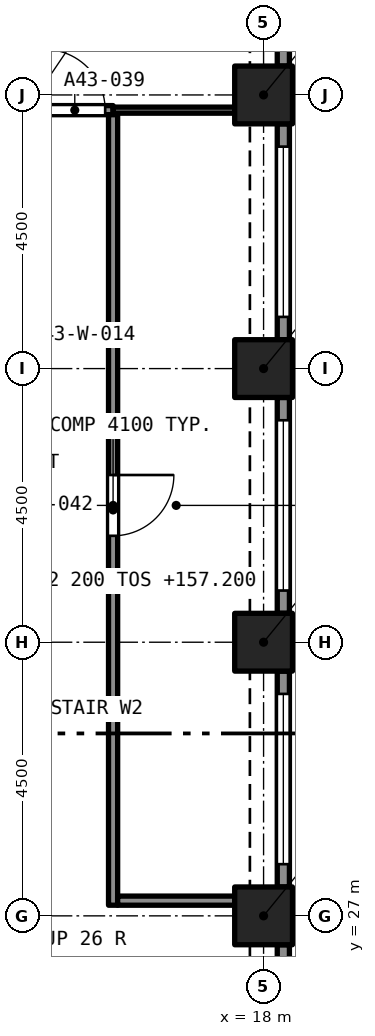
"""IFC4 building model, lengths in metres.
Left out: names, types, materials, properties, quantities, classifications, styles, units other than length and angle.
Written with IfcOpenShell. Run it as: python <this file> out.ifc"""

import sys

from ifc_helpers import new_model, si_unit, direction, frame, frame_2d, origin, origin_2d, place, context, subcontext, project, spatial, rectangle, extrude, element, fill, save


model = new_model("IFC4")
c1 = context("Model", 3, precision=1e-05, world=origin(), true_north=direction((0.0, 1.0)))
c2 = subcontext(c1, "Body", "Model", "MODEL_VIEW")
j1 = project(units=[si_unit("LENGTHUNIT", "METRE"), si_unit("PLANEANGLEUNIT", "RADIAN")], contexts=[c1])
p1 = place(None, origin())
s1 = spatial("IfcSite", under=j1, at=p1, CompositionType="ELEMENT")
p2 = place(p1, origin())
s2 = spatial("IfcBuilding", under=s1, at=p2, CompositionType="ELEMENT")
p3 = place(p2, frame((0.0, 0.0, 155.0)))
s3 = spatial("IfcBuildingStorey", under=s2, at=p3, CompositionType="ELEMENT", Elevation=155.0)
for number, where, z_axis, x_axis in (
    (1, (18.0, 27.0, 0.0), (0.0, 0.0, 1.0), (1.0, 0.0, 0.0)),
    (2, (18.0, 31.5, 0.0), (0.0, 0.0, 1.0), (1.0, 0.0, 0.0)),
    (3, (18.0, 36.0, 0.0), (0.0, 0.0, 1.0), (1.0, 0.0, 0.0)),
    (4, (18.0, 40.5, 0.0), (0.0, 0.0, 1.0), (1.0, 0.0, 0.0)),
):
    element("IfcColumn", number, at=place(p3, frame(where, z_axis=z_axis, x_axis=x_axis)), inside=s3, PredefinedType="COLUMN", context=c2, shape_type="SweptSolid", body=[
        extrude(rectangle(XDim=0.95, YDim=0.95, at=origin_2d()), origin(), (0.0, 0.0, 1.0), 4.4),
    ])
p4 = place(p3, frame((18.325, 26.525, 0.0), z_axis=(0.0, 0.0, 1.0), x_axis=(0.0, -1.0, 0.0)))
e5 = element("IfcWall", 5, at=p4, inside=s3, PredefinedType="SOLIDWALL", context=c2, shape_type="SweptSolid", body=[
    extrude(rectangle(XDim=3.55, YDim=0.2, at=frame_2d((1.775, 0.0))), origin(), (0.0, 0.0, 1.0), 4.4),
])
p5 = place(p4, frame((0.375, 0.0, 0.45)))
e6 = element("IfcOpeningElement", 6, at=p5, cuts=e5, PredefinedType="OPENING", context=c2, shape_type="SweptSolid", body=[
    extrude(rectangle(XDim=2.8, YDim=2.55, at=frame_2d((1.4, 1.275))), frame((0.0, 0.11, 0.0), z_axis=(0.0, -1.0, 0.0), x_axis=(1.0, 0.0, 0.0)), (0.0, 0.0, 1.0), 0.22),
])
p6 = place(p3, frame((18.325, 31.025, 0.0), z_axis=(0.0, 0.0, 1.0), x_axis=(0.0, -1.0, 0.0)))
e7 = element("IfcWall", 7, at=p6, inside=s3, PredefinedType="SOLIDWALL", context=c2, shape_type="SweptSolid", body=[
    extrude(rectangle(XDim=3.55, YDim=0.2, at=frame_2d((1.775, 0.0))), origin(), (0.0, 0.0, 1.0), 4.4),
])
p7 = place(p6, frame((0.375, 0.0, 0.45)))
e8 = element("IfcOpeningElement", 8, at=p7, cuts=e7, PredefinedType="OPENING", context=c2, shape_type="SweptSolid", body=[
    extrude(rectangle(XDim=2.8, YDim=2.55, at=frame_2d((1.4, 1.275))), frame((0.0, 0.11, 0.0), z_axis=(0.0, -1.0, 0.0), x_axis=(1.0, 0.0, 0.0)), (0.0, 0.0, 1.0), 0.22),
])
p8 = place(p3, frame((18.325, 35.525, 0.0), z_axis=(0.0, 0.0, 1.0), x_axis=(0.0, -1.0, 0.0)))
e9 = element("IfcWall", 9, at=p8, inside=s3, PredefinedType="SOLIDWALL", context=c2, shape_type="SweptSolid", body=[
    extrude(rectangle(XDim=3.55, YDim=0.2, at=frame_2d((1.775, 0.0))), origin(), (0.0, 0.0, 1.0), 4.4),
])
p9 = place(p8, frame((0.375, 0.0, 0.45)))
e10 = element("IfcOpeningElement", 10, at=p9, cuts=e9, PredefinedType="OPENING", context=c2, shape_type="SweptSolid", body=[
    extrude(rectangle(XDim=2.8, YDim=2.55, at=frame_2d((1.4, 1.275))), frame((0.0, 0.11, 0.0), z_axis=(0.0, -1.0, 0.0), x_axis=(1.0, 0.0, 0.0)), (0.0, 0.0, 1.0), 0.22),
])
p10 = place(p3, frame((18.325, 40.025, 0.0), z_axis=(0.0, 0.0, 1.0), x_axis=(0.0, -1.0, 0.0)))
e11 = element("IfcWall", 11, at=p10, inside=s3, PredefinedType="SOLIDWALL", context=c2, shape_type="SweptSolid", body=[
    extrude(rectangle(XDim=3.55, YDim=0.2, at=frame_2d((1.775, 0.0))), origin(), (0.0, 0.0, 1.0), 4.4),
])
p11 = place(p10, frame((0.375, 0.0, 0.45)))
e12 = element("IfcOpeningElement", 12, at=p11, cuts=e11, PredefinedType="OPENING", context=c2, shape_type="SweptSolid", body=[
    extrude(rectangle(XDim=2.8, YDim=2.55, at=frame_2d((1.4, 1.275))), frame((0.0, 0.11, 0.0), z_axis=(0.0, -1.0, 0.0), x_axis=(1.0, 0.0, 0.0)), (0.0, 0.0, 1.0), 0.22),
])
p12 = place(p3, frame((18.325, 44.525, 0.0), z_axis=(0.0, 0.0, 1.0), x_axis=(0.0, -1.0, 0.0)))
e13 = element("IfcWall", 13, at=p12, inside=s3, PredefinedType="SOLIDWALL", context=c2, shape_type="SweptSolid", body=[
    extrude(rectangle(XDim=3.55, YDim=0.2, at=frame_2d((1.775, 0.0))), origin(), (0.0, 0.0, 1.0), 4.4),
])
p13 = place(p12, frame((0.375, 0.0, 0.45)))
e14 = element("IfcOpeningElement", 14, at=p13, cuts=e13, PredefinedType="OPENING", context=c2, shape_type="SweptSolid", body=[
    extrude(rectangle(XDim=2.8, YDim=2.55, at=frame_2d((1.4, 1.275))), frame((0.0, 0.11, 0.0), z_axis=(0.0, -1.0, 0.0), x_axis=(1.0, 0.0, 0.0)), (0.0, 0.0, 1.0), 0.22),
])
p14 = place(p3, frame((13.25, 40.25, 0.0), z_axis=(0.0, 0.0, 1.0), x_axis=(1.0, 0.0, 0.0)))
e15 = element("IfcWall", 15, at=p14, inside=s3, PredefinedType="PARTITIONING", context=c2, shape_type="SweptSolid", body=[
    extrude(rectangle(XDim=2.275, YDim=0.15, at=frame_2d((1.137, 0.0))), origin(), (0.0, 0.0, 1.0), 4.1),
])
p15 = place(p14, frame((1.145, 0.0, 0.0)))
e16 = element("IfcOpeningElement", 16, at=p15, cuts=e15, PredefinedType="OPENING", context=c2, shape_type="SweptSolid", body=[
    extrude(rectangle(XDim=1.0, YDim=2.1, at=frame_2d((0.5, 1.05))), frame((0.0, 0.085, 0.0), z_axis=(0.0, -1.0, 0.0), x_axis=(1.0, 0.0, 0.0)), (0.0, 0.0, 1.0), 0.17),
])
p16 = place(p3, frame((15.525, 40.25, 0.0), z_axis=(0.0, 0.0, 1.0), x_axis=(1.0, 0.0, 0.0)))
e17 = element("IfcWall", 17, at=p16, inside=s3, PredefinedType="PARTITIONING", context=c2, shape_type="SweptSolid", body=[
    extrude(rectangle(XDim=2.0, YDim=0.1, at=frame_2d((1.0, 0.0))), origin(), (0.0, 0.0, 1.0), 4.1),
])
p17 = place(p3, frame((15.525, 40.175, 0.0), z_axis=(0.0, 0.0, 1.0), x_axis=(0.0, -1.0, 0.0)))
e18 = element("IfcWall", 18, at=p17, inside=s3, PredefinedType="PARTITIONING", context=c2, shape_type="SweptSolid", body=[
    extrude(rectangle(XDim=13.0, YDim=0.15, at=frame_2d((6.5, 0.0))), origin(), (0.0, 0.0, 1.0), 4.1),
])
p18 = place(p17, frame((5.925, 0.0, 0.0)))
e19 = element("IfcOpeningElement", 19, at=p18, cuts=e18, PredefinedType="OPENING", context=c2, shape_type="SweptSolid", body=[
    extrude(rectangle(XDim=1.0, YDim=2.1, at=frame_2d((0.5, 1.05))), frame((0.0, 0.085, 0.0), z_axis=(0.0, -1.0, 0.0), x_axis=(1.0, 0.0, 0.0)), (0.0, 0.0, 1.0), 0.17),
])
p19 = place(p3, frame((15.6, 27.25, 0.0), z_axis=(0.0, 0.0, 1.0), x_axis=(1.0, 0.0, 0.0)))
e20 = element("IfcWall", 20, at=p19, inside=s3, PredefinedType="PARTITIONING", context=c2, shape_type="SweptSolid", body=[
    extrude(rectangle(XDim=1.925, YDim=0.15, at=frame_2d((0.962, 0.0))), origin(), (0.0, 0.0, 1.0), 4.1),
])
p20 = place(p7, origin())
e21 = element("IfcWindow", 21, at=p20, inside=s3, PartitioningType="SINGLE_PANEL", PredefinedType="WINDOW", context=c2, shape_type="SweptSolid", body=[
    extrude(rectangle(XDim=2.8, YDim=2.55, at=frame_2d((1.4, 1.275))), frame((0.0, 0.03, 0.0), z_axis=(0.0, -1.0, 0.0), x_axis=(1.0, 0.0, 0.0)), (0.0, 0.0, 1.0), 0.06),
])
fill(e8, e21)
p21 = place(p9, origin())
e22 = element("IfcWindow", 22, at=p21, inside=s3, PartitioningType="SINGLE_PANEL", PredefinedType="WINDOW", context=c2, shape_type="SweptSolid", body=[
    extrude(rectangle(XDim=2.8, YDim=2.55, at=frame_2d((1.4, 1.275))), frame((0.0, 0.03, 0.0), z_axis=(0.0, -1.0, 0.0), x_axis=(1.0, 0.0, 0.0)), (0.0, 0.0, 1.0), 0.06),
])
fill(e10, e22)
p22 = place(p11, origin())
e23 = element("IfcWindow", 23, at=p22, inside=s3, PartitioningType="SINGLE_PANEL", PredefinedType="WINDOW", context=c2, shape_type="SweptSolid", body=[
    extrude(rectangle(XDim=2.8, YDim=2.55, at=frame_2d((1.4, 1.275))), frame((0.0, 0.03, 0.0), z_axis=(0.0, -1.0, 0.0), x_axis=(1.0, 0.0, 0.0)), (0.0, 0.0, 1.0), 0.06),
])
fill(e12, e23)
p23 = place(p15, origin())
e24 = element("IfcDoor", 24, at=p23, inside=s3, OperationType="SINGLE_SWING_RIGHT", PredefinedType="DOOR", context=c2, shape_type="SweptSolid", body=[
    extrude(rectangle(XDim=1.0, YDim=2.1, at=frame_2d((0.5, 1.05))), frame((0.0, 0.025, 0.0), z_axis=(0.0, -1.0, 0.0), x_axis=(1.0, 0.0, 0.0)), (0.0, 0.0, 1.0), 0.05),
])
fill(e16, e24)
p24 = place(p18, origin())
e25 = element("IfcDoor", 25, at=p24, inside=s3, OperationType="SINGLE_SWING_LEFT", PredefinedType="DOOR", context=c2, shape_type="SweptSolid", body=[
    extrude(rectangle(XDim=1.0, YDim=2.1, at=frame_2d((0.5, 1.05))), frame((0.0, 0.025, 0.0), z_axis=(0.0, -1.0, 0.0), x_axis=(1.0, 0.0, 0.0)), (0.0, 0.0, 1.0), 0.05),
])
fill(e19, e25)
save(model, sys.argv[1])
